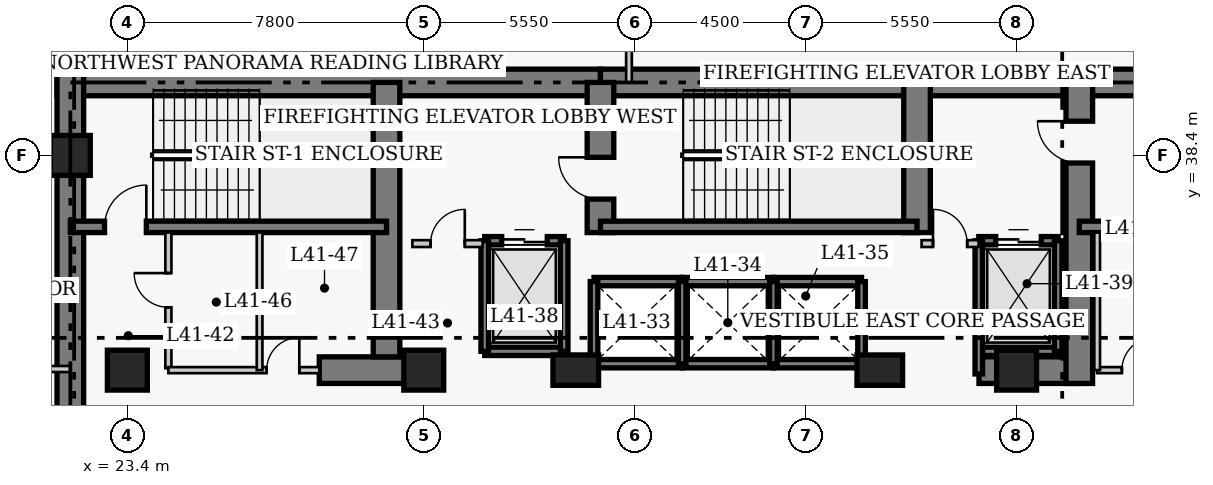
"""IFC4 building model, lengths in metres.
Left out: names, types, materials, properties, quantities, classifications, styles, units other than length and angle.
Written with IfcOpenShell. Run it as: python <this file> out.ifc"""

import sys

from ifc_helpers import new_model, si_unit, direction, frame, frame_2d, origin, origin_2d, place, context, subcontext, project, spatial, rectangle, extrude, element, fill, save


model = new_model("IFC4")
c1 = context("Model", 3, precision=1e-05, world=origin(), true_north=direction((0.0, 1.0)))
c2 = subcontext(c1, "Body", "Model", "MODEL_VIEW")
j1 = project(units=[si_unit("LENGTHUNIT", "METRE"), si_unit("PLANEANGLEUNIT", "RADIAN")], contexts=[c1])
p1 = place(None, origin())
s1 = spatial("IfcSite", under=j1, at=p1, CompositionType="ELEMENT")
p2 = place(p1, origin())
s2 = spatial("IfcBuilding", under=s1, at=p2, CompositionType="ELEMENT")
p3 = place(p2, frame((0.0, 0.0, 165.0)))
s3 = spatial("IfcBuildingStorey", under=s2, at=p3, CompositionType="ELEMENT", Elevation=165.0)
p4 = place(p3, frame((21.55, 40.32, 0.0), z_axis=(0.0, 0.0, 1.0), x_axis=(1.0, 0.0, 0.0)))
e1 = element("IfcWall", 1, at=p4, inside=s3, PredefinedType="SHEAR", context=c2, shape_type="SweptSolid", body=[
    extrude(rectangle(XDim=14.3, YDim=0.7, at=frame_2d((7.15, 0.0))), origin(), (0.0, 0.0, 1.0), 3.8),
])
p5 = place(p3, frame((35.85, 40.32, 0.0), z_axis=(0.0, 0.0, 1.0), x_axis=(1.0, 0.0, 0.0)))
e2 = element("IfcWall", 2, at=p5, inside=s3, PredefinedType="SHEAR", context=c2, shape_type="SweptSolid", body=[
    extrude(rectangle(XDim=12.6, YDim=0.7, at=frame_2d((6.3, 0.0))), origin(), (0.0, 0.0, 1.0), 3.8),
])
p6 = place(p3, frame((48.45, 40.32, 0.0), z_axis=(0.0, 0.0, 1.0), x_axis=(1.0, 0.0, 0.0)))
e3 = element("IfcWall", 3, at=p6, inside=s3, PredefinedType="SHEAR", context=c2, shape_type="SweptSolid", body=[
    extrude(rectangle(XDim=8.77, YDim=0.7, at=frame_2d((4.385, 0.0))), origin(), (0.0, 0.0, 1.0), 3.8),
])
p7 = place(p3, frame((21.9, 27.05, 0.0), z_axis=(0.0, 0.0, 1.0), x_axis=(0.0, 1.0, 0.0)))
e4 = element("IfcWall", 4, at=p7, inside=s3, PredefinedType="SHEAR", context=c2, shape_type="SweptSolid", body=[
    extrude(rectangle(XDim=13.62, YDim=0.7, at=frame_2d((6.81, 0.0))), origin(), (0.0, 0.0, 1.0), 3.8),
])
p8 = place(p3, frame((28.45, 32.75, 0.0), z_axis=(0.0, 0.0, 1.0), x_axis=(1.0, 0.0, 0.0)))
e5 = element("IfcWall", 5, at=p8, inside=s3, PredefinedType="SHEAR", context=c2, shape_type="SweptSolid", body=[
    extrude(rectangle(XDim=2.4, YDim=0.7, at=frame_2d((1.2, 0.0))), origin(), (0.0, 0.0, 1.0), 3.8),
])
p9 = place(p3, frame((45.81, 32.75, 0.0), z_axis=(0.0, 0.0, 1.0), x_axis=(1.0, 0.0, 0.0)))
e6 = element("IfcWall", 6, at=p9, inside=s3, PredefinedType="SHEAR", context=c2, shape_type="SweptSolid", body=[
    extrude(rectangle(XDim=2.64, YDim=0.7, at=frame_2d((1.32, 0.0))), origin(), (0.0, 0.0, 1.0), 3.8),
])
p10 = place(p3, frame((30.22, 33.1, 0.0), z_axis=(0.0, 0.0, 1.0), x_axis=(0.0, 1.0, 0.0)))
e7 = element("IfcWall", 7, at=p10, inside=s3, PredefinedType="SHEAR", context=c2, shape_type="SweptSolid", body=[
    extrude(rectangle(XDim=7.22, YDim=0.7, at=frame_2d((3.61, 0.0))), origin(), (0.0, 0.0, 1.0), 3.8),
])
p11 = place(p3, frame((35.85, 36.37, 0.0), z_axis=(0.0, 0.0, 1.0), x_axis=(0.0, 1.0, 0.0)))
e8 = element("IfcWall", 8, at=p11, inside=s3, PredefinedType="SHEAR", context=c2, shape_type="SweptSolid", body=[
    extrude(rectangle(XDim=3.95, YDim=0.7, at=frame_2d((1.975, 0.0))), origin(), (0.0, 0.0, 1.0), 3.8),
])
p12 = place(p11, frame((0.88, 0.0, 0.0)))
e9 = element("IfcOpeningElement", 9, at=p12, cuts=e8, PredefinedType="OPENING", context=c2, shape_type="SweptSolid", body=[
    extrude(rectangle(XDim=1.1, YDim=2.15, at=frame_2d((0.55, 1.075))), frame((0.0, 0.36, 0.0), z_axis=(0.0, -1.0, 0.0), x_axis=(1.0, 0.0, 0.0)), (0.0, 0.0, 1.0), 0.72),
])
p13 = place(p3, frame((44.18, 36.37, 0.0), z_axis=(0.0, 0.0, 1.0), x_axis=(0.0, 1.0, 0.0)))
e10 = element("IfcWall", 10, at=p13, inside=s3, PredefinedType="SHEAR", context=c2, shape_type="SweptSolid", body=[
    extrude(rectangle(XDim=3.95, YDim=0.7, at=frame_2d((1.975, 0.0))), origin(), (0.0, 0.0, 1.0), 3.8),
])
p14 = place(p3, frame((48.45, 32.4, 0.0), z_axis=(0.0, 0.0, 1.0), x_axis=(0.0, 1.0, 0.0)))
e11 = element("IfcWall", 11, at=p14, inside=s3, PredefinedType="SHEAR", context=c2, shape_type="SweptSolid", body=[
    extrude(rectangle(XDim=7.92, YDim=0.7, at=frame_2d((3.96, 0.0))), origin(), (0.0, 0.0, 1.0), 3.8),
])
p15 = place(p14, frame((5.8, 0.0, 0.0)))
e12 = element("IfcOpeningElement", 12, at=p15, cuts=e11, PredefinedType="OPENING", context=c2, shape_type="SweptSolid", body=[
    extrude(rectangle(XDim=1.1, YDim=2.15, at=frame_2d((0.55, 1.075))), frame((0.0, 0.36, 0.0), z_axis=(0.0, -1.0, 0.0), x_axis=(1.0, 0.0, 0.0)), (0.0, 0.0, 1.0), 0.72),
])
p16 = place(p3, frame((21.9, 36.52, 0.0), z_axis=(0.0, 0.0, 1.0), x_axis=(1.0, 0.0, 0.0)))
e13 = element("IfcWall", 13, at=p16, inside=s3, PredefinedType="SHEAR", context=c2, shape_type="SweptSolid", body=[
    extrude(rectangle(XDim=8.32, YDim=0.3, at=frame_2d((4.16, 0.0))), origin(), (0.0, 0.0, 1.0), 3.8),
])
p17 = place(p16, frame((0.9, 0.0, 0.0)))
e14 = element("IfcOpeningElement", 14, at=p17, cuts=e13, PredefinedType="OPENING", context=c2, shape_type="SweptSolid", body=[
    extrude(rectangle(XDim=1.1, YDim=2.15, at=frame_2d((0.55, 1.075))), frame((0.0, 0.16, 0.0), z_axis=(0.0, -1.0, 0.0), x_axis=(1.0, 0.0, 0.0)), (0.0, 0.0, 1.0), 0.32),
])
p18 = place(p3, frame((35.85, 36.52, 0.0), z_axis=(0.0, 0.0, 1.0), x_axis=(1.0, 0.0, 0.0)))
e15 = element("IfcWall", 15, at=p18, inside=s3, PredefinedType="SHEAR", context=c2, shape_type="SweptSolid", body=[
    extrude(rectangle(XDim=8.33, YDim=0.3, at=frame_2d((4.165, 0.0))), origin(), (0.0, 0.0, 1.0), 3.8),
])
p19 = place(p3, frame((48.45, 36.52, 0.0), z_axis=(0.0, 0.0, 1.0), x_axis=(1.0, 0.0, 0.0)))
e16 = element("IfcWall", 16, at=p19, inside=s3, PredefinedType="SHEAR", context=c2, shape_type="SweptSolid", body=[
    extrude(rectangle(XDim=8.42, YDim=0.3, at=frame_2d((4.21, 0.0))), origin(), (0.0, 0.0, 1.0), 3.8),
])
for number, where, z_axis, x_axis in (
    (17, (21.9, 38.4, 0.0), (0.0, 0.0, 1.0), (1.0, 0.0, 0.0)),
    (18, (23.4, 32.75, 0.0), (0.0, 0.0, 1.0), (1.0, 0.0, 0.0)),
    (19, (31.2, 32.75, 0.0), (0.0, 0.0, 1.0), (1.0, 0.0, 0.0)),
):
    element("IfcColumn", number, at=place(p3, frame(where, z_axis=z_axis, x_axis=x_axis)), inside=s3, PredefinedType="COLUMN", context=c2, shape_type="SweptSolid", body=[
        extrude(rectangle(XDim=1.05, YDim=1.05, at=origin_2d()), origin(), (0.0, 0.0, 1.0), 3.8),
    ])
for number, where, z_axis, x_axis in (
    (20, (35.2, 32.75, 0.0), (0.0, 0.0, 1.0), (1.0, 0.0, 0.0)),
    (21, (43.2, 32.75, 0.0), (0.0, 0.0, 1.0), (1.0, 0.0, 0.0)),
):
    element("IfcColumn", number, at=place(p3, frame(where, z_axis=z_axis, x_axis=x_axis)), inside=s3, PredefinedType="COLUMN", context=c2, shape_type="SweptSolid", body=[
        extrude(rectangle(XDim=1.2, YDim=0.8, at=origin_2d()), origin(), (0.0, 0.0, 1.0), 3.8),
    ])
p20 = place(p3, frame((46.8, 32.75, 0.0), z_axis=(0.0, 0.0, 1.0), x_axis=(1.0, 0.0, 0.0)))
e22 = element("IfcColumn", 22, at=p20, inside=s3, PredefinedType="COLUMN", context=c2, shape_type="SweptSolid", body=[
    extrude(rectangle(XDim=1.05, YDim=1.05, at=origin_2d()), origin(), (0.0, 0.0, 1.0), 3.8),
])
for number, where, z_axis, x_axis in (
    (23, (35.68, 35.08, 0.0), (0.0, 0.0, 1.0), (1.0, 0.0, 0.0)),
    (24, (35.68, 32.92, 0.0), (0.0, 0.0, 1.0), (1.0, 0.0, 0.0)),
):
    element("IfcWall", number, at=place(p3, frame(where, z_axis=z_axis, x_axis=x_axis)), inside=s3, PredefinedType="SHEAR", context=c2, shape_type="SweptSolid", body=[
        extrude(rectangle(XDim=2.32, YDim=0.22, at=frame_2d((1.16, 0.0))), origin(), (0.0, 0.0, 1.0), 3.8),
    ])
p21 = place(p3, frame((35.68, 32.92, 0.0), z_axis=(0.0, 0.0, 1.0), x_axis=(0.0, 1.0, 0.0)))
e25 = element("IfcWall", 25, at=p21, inside=s3, PredefinedType="SHEAR", context=c2, shape_type="SweptSolid", body=[
    extrude(rectangle(XDim=2.16, YDim=0.2, at=frame_2d((1.08, 0.0))), origin(), (0.0, 0.0, 1.0), 3.8),
])
for number, where, z_axis, x_axis in (
    (26, (38.0, 35.08, 0.0), (0.0, 0.0, 1.0), (1.0, 0.0, 0.0)),
    (27, (38.0, 32.92, 0.0), (0.0, 0.0, 1.0), (1.0, 0.0, 0.0)),
):
    element("IfcWall", number, at=place(p3, frame(where, z_axis=z_axis, x_axis=x_axis)), inside=s3, PredefinedType="SHEAR", context=c2, shape_type="SweptSolid", body=[
        extrude(rectangle(XDim=2.4, YDim=0.22, at=frame_2d((1.2, 0.0))), origin(), (0.0, 0.0, 1.0), 3.8),
    ])
p22 = place(p3, frame((38.0, 32.92, 0.0), z_axis=(0.0, 0.0, 1.0), x_axis=(0.0, 1.0, 0.0)))
e28 = element("IfcWall", 28, at=p22, inside=s3, PredefinedType="SHEAR", context=c2, shape_type="SweptSolid", body=[
    extrude(rectangle(XDim=2.16, YDim=0.2, at=frame_2d((1.08, 0.0))), origin(), (0.0, 0.0, 1.0), 3.8),
])
for number, where, z_axis, x_axis in (
    (29, (40.4, 35.08, 0.0), (0.0, 0.0, 1.0), (1.0, 0.0, 0.0)),
    (30, (40.4, 32.92, 0.0), (0.0, 0.0, 1.0), (1.0, 0.0, 0.0)),
):
    element("IfcWall", number, at=place(p3, frame(where, z_axis=z_axis, x_axis=x_axis)), inside=s3, PredefinedType="SHEAR", context=c2, shape_type="SweptSolid", body=[
        extrude(rectangle(XDim=2.32, YDim=0.22, at=frame_2d((1.16, 0.0))), origin(), (0.0, 0.0, 1.0), 3.8),
    ])
for number, where, z_axis, x_axis in (
    (31, (40.4, 32.92, 0.0), (0.0, 0.0, 1.0), (0.0, 1.0, 0.0)),
    (32, (42.72, 32.92, 0.0), (0.0, 0.0, 1.0), (0.0, 1.0, 0.0)),
):
    element("IfcWall", number, at=place(p3, frame(where, z_axis=z_axis, x_axis=x_axis)), inside=s3, PredefinedType="SHEAR", context=c2, shape_type="SweptSolid", body=[
        extrude(rectangle(XDim=2.16, YDim=0.2, at=frame_2d((1.08, 0.0))), origin(), (0.0, 0.0, 1.0), 3.8),
    ])
p23 = place(p3, frame((32.805, 36.155, 0.0), z_axis=(0.0, 0.0, 1.0), x_axis=(1.0, 0.0, 0.0)))
e33 = element("IfcWall", 33, at=p23, inside=s3, PredefinedType="SHEAR", context=c2, shape_type="SweptSolid", body=[
    extrude(rectangle(XDim=2.09, YDim=0.22, at=frame_2d((1.045, 0.0))), origin(), (0.0, 0.0, 1.0), 3.8),
])
p24 = place(p23, frame((0.445, 0.0, 0.0)))
e34 = element("IfcOpeningElement", 34, at=p24, cuts=e33, PredefinedType="OPENING", context=c2, shape_type="SweptSolid", body=[
    extrude(rectangle(XDim=1.2, YDim=2.15, at=frame_2d((0.6, 1.075))), frame((0.0, 0.12, 0.0), z_axis=(0.0, -1.0, 0.0), x_axis=(1.0, 0.0, 0.0)), (0.0, 0.0, 1.0), 0.24),
])
p25 = place(p3, frame((32.805, 33.245, 0.0), z_axis=(0.0, 0.0, 1.0), x_axis=(1.0, 0.0, 0.0)))
e35 = element("IfcWall", 35, at=p25, inside=s3, PredefinedType="SHEAR", context=c2, shape_type="SweptSolid", body=[
    extrude(rectangle(XDim=2.09, YDim=0.22, at=frame_2d((1.045, 0.0))), origin(), (0.0, 0.0, 1.0), 3.8),
])
for number, where, z_axis, x_axis in (
    (36, (32.805, 33.245, 0.0), (0.0, 0.0, 1.0), (0.0, 1.0, 0.0)),
    (37, (34.895, 33.245, 0.0), (0.0, 0.0, 1.0), (0.0, 1.0, 0.0)),
):
    element("IfcWall", number, at=place(p3, frame(where, z_axis=z_axis, x_axis=x_axis)), inside=s3, PredefinedType="SHEAR", context=c2, shape_type="SweptSolid", body=[
        extrude(rectangle(XDim=2.91, YDim=0.2, at=frame_2d((1.455, 0.0))), origin(), (0.0, 0.0, 1.0), 3.8),
    ])
p26 = place(p3, frame((45.805, 36.155, 0.0), z_axis=(0.0, 0.0, 1.0), x_axis=(1.0, 0.0, 0.0)))
e38 = element("IfcWall", 38, at=p26, inside=s3, PredefinedType="SHEAR", context=c2, shape_type="SweptSolid", body=[
    extrude(rectangle(XDim=2.09, YDim=0.22, at=frame_2d((1.045, 0.0))), origin(), (0.0, 0.0, 1.0), 3.8),
])
p27 = place(p26, frame((0.445, 0.0, 0.0)))
e39 = element("IfcOpeningElement", 39, at=p27, cuts=e38, PredefinedType="OPENING", context=c2, shape_type="SweptSolid", body=[
    extrude(rectangle(XDim=1.2, YDim=2.15, at=frame_2d((0.6, 1.075))), frame((0.0, 0.12, 0.0), z_axis=(0.0, -1.0, 0.0), x_axis=(1.0, 0.0, 0.0)), (0.0, 0.0, 1.0), 0.24),
])
p28 = place(p3, frame((45.805, 33.245, 0.0), z_axis=(0.0, 0.0, 1.0), x_axis=(1.0, 0.0, 0.0)))
e40 = element("IfcWall", 40, at=p28, inside=s3, PredefinedType="SHEAR", context=c2, shape_type="SweptSolid", body=[
    extrude(rectangle(XDim=2.09, YDim=0.22, at=frame_2d((1.045, 0.0))), origin(), (0.0, 0.0, 1.0), 3.8),
])
p29 = place(p3, frame((45.805, 32.65, 0.0), z_axis=(0.0, 0.0, 1.0), x_axis=(0.0, 1.0, 0.0)))
e41 = element("IfcWall", 41, at=p29, inside=s3, PredefinedType="SHEAR", context=c2, shape_type="SweptSolid", body=[
    extrude(rectangle(XDim=3.505, YDim=0.2, at=frame_2d((1.752, 0.0))), origin(), (0.0, 0.0, 1.0), 3.8),
])
p30 = place(p3, frame((47.895, 33.245, 0.0), z_axis=(0.0, 0.0, 1.0), x_axis=(0.0, 1.0, 0.0)))
e42 = element("IfcWall", 42, at=p30, inside=s3, PredefinedType="SHEAR", context=c2, shape_type="SweptSolid", body=[
    extrude(rectangle(XDim=2.91, YDim=0.2, at=frame_2d((1.455, 0.0))), origin(), (0.0, 0.0, 1.0), 3.8),
])
p31 = place(p3, frame((30.9, 36.08, 0.0), z_axis=(0.0, 0.0, 1.0), x_axis=(1.0, 0.0, 0.0)))
e43 = element("IfcWall", 43, at=p31, inside=s3, PredefinedType="PARTITIONING", context=c2, shape_type="SweptSolid", body=[
    extrude(rectangle(XDim=1.85, YDim=0.18, at=frame_2d((0.925, 0.0))), origin(), (0.0, 0.0, 1.0), 3.55),
])
p32 = place(p31, frame((0.48, 0.0, 0.0)))
e44 = element("IfcOpeningElement", 44, at=p32, cuts=e43, PredefinedType="OPENING", context=c2, shape_type="SweptSolid", body=[
    extrude(rectangle(XDim=0.9, YDim=2.15, at=frame_2d((0.45, 1.075))), frame((0.0, 0.1, 0.0), z_axis=(0.0, -1.0, 0.0), x_axis=(1.0, 0.0, 0.0)), (0.0, 0.0, 1.0), 0.2),
])
p33 = place(p3, frame((44.3, 36.08, 0.0), z_axis=(0.0, 0.0, 1.0), x_axis=(1.0, 0.0, 0.0)))
e45 = element("IfcWall", 45, at=p33, inside=s3, PredefinedType="PARTITIONING", context=c2, shape_type="SweptSolid", body=[
    extrude(rectangle(XDim=1.5, YDim=0.18, at=frame_2d((0.75, 0.0))), origin(), (0.0, 0.0, 1.0), 3.55),
])
p34 = place(p33, frame((0.3, 0.0, 0.0)))
e46 = element("IfcOpeningElement", 46, at=p34, cuts=e45, PredefinedType="OPENING", context=c2, shape_type="SweptSolid", body=[
    extrude(rectangle(XDim=0.9, YDim=2.15, at=frame_2d((0.45, 1.075))), frame((0.0, 0.1, 0.0), z_axis=(0.0, -1.0, 0.0), x_axis=(1.0, 0.0, 0.0)), (0.0, 0.0, 1.0), 0.2),
])
p35 = place(p3, frame((24.48, 32.8, 0.0), z_axis=(0.0, 0.0, 1.0), x_axis=(0.0, 1.0, 0.0)))
e47 = element("IfcWall", 47, at=p35, inside=s3, PredefinedType="PARTITIONING", context=c2, shape_type="SweptSolid", body=[
    extrude(rectangle(XDim=3.57, YDim=0.16, at=frame_2d((1.785, 0.0))), origin(), (0.0, 0.0, 1.0), 3.55),
])
p36 = place(p35, frame((1.604, 0.0, 0.0)))
e48 = element("IfcOpeningElement", 48, at=p36, cuts=e47, PredefinedType="OPENING", context=c2, shape_type="SweptSolid", body=[
    extrude(rectangle(XDim=0.9, YDim=2.1, at=frame_2d((0.45, 1.05))), frame((0.0, 0.09, 0.0), z_axis=(0.0, -1.0, 0.0), x_axis=(1.0, 0.0, 0.0)), (0.0, 0.0, 1.0), 0.18),
])
p37 = place(p3, frame((24.48, 32.75, 0.0), z_axis=(0.0, 0.0, 1.0), x_axis=(1.0, 0.0, 0.0)))
e49 = element("IfcWall", 49, at=p37, inside=s3, PredefinedType="PARTITIONING", context=c2, shape_type="SweptSolid", body=[
    extrude(rectangle(XDim=3.97, YDim=0.16, at=frame_2d((1.985, 0.0))), origin(), (0.0, 0.0, 1.0), 3.55),
])
p38 = place(p37, frame((2.585, 0.0, 0.0)))
e50 = element("IfcOpeningElement", 50, at=p38, cuts=e49, PredefinedType="OPENING", context=c2, shape_type="SweptSolid", body=[
    extrude(rectangle(XDim=0.86, YDim=2.05, at=frame_2d((0.43, 1.025))), frame((0.0, 0.09, 0.0), z_axis=(0.0, -1.0, 0.0), x_axis=(1.0, 0.0, 0.0)), (0.0, 0.0, 1.0), 0.18),
])
p39 = place(p3, frame((48.92, 32.75, 0.0), z_axis=(0.0, 0.0, 1.0), x_axis=(1.0, 0.0, 0.0)))
e51 = element("IfcWall", 51, at=p39, inside=s3, PredefinedType="PARTITIONING", context=c2, shape_type="SweptSolid", body=[
    extrude(rectangle(XDim=2.2, YDim=0.16, at=frame_2d((1.1, 0.0))), origin(), (0.0, 0.0, 1.0), 3.55),
])
p40 = place(p39, frame((0.65, 0.0, 0.0)))
e52 = element("IfcOpeningElement", 52, at=p40, cuts=e51, PredefinedType="OPENING", context=c2, shape_type="SweptSolid", body=[
    extrude(rectangle(XDim=0.86, YDim=2.05, at=frame_2d((0.43, 1.025))), frame((0.0, 0.09, 0.0), z_axis=(0.0, -1.0, 0.0), x_axis=(1.0, 0.0, 0.0)), (0.0, 0.0, 1.0), 0.18),
])
for number, where, z_axis, x_axis in (
    (53, (48.92, 32.75, 0.0), (0.0, 0.0, 1.0), (0.0, 1.0, 0.0)),
    (54, (26.88, 32.75, 0.0), (0.0, 0.0, 1.0), (0.0, 1.0, 0.0)),
):
    element("IfcWall", number, at=place(p3, frame(where, z_axis=z_axis, x_axis=x_axis)), inside=s3, PredefinedType="PARTITIONING", context=c2, shape_type="SweptSolid", body=[
        extrude(rectangle(XDim=3.62, YDim=0.15, at=frame_2d((1.81, 0.0))), origin(), (0.0, 0.0, 1.0), 3.55),
    ])
for number, where, z_axis, x_axis in (
    (55, (18.86, 35.02, 0.0), (0.0, 0.0, 1.0), (1.0, 0.0, 0.0)),
    (56, (18.86, 32.78, 0.0), (0.0, 0.0, 1.0), (1.0, 0.0, 0.0)),
):
    element("IfcWall", number, at=place(p3, frame(where, z_axis=z_axis, x_axis=x_axis)), inside=s3, PredefinedType="PARTITIONING", context=c2, shape_type="SweptSolid", body=[
        extrude(rectangle(XDim=3.04, YDim=0.16, at=frame_2d((1.52, 0.0))), origin(), (0.0, 0.0, 1.0), 3.55),
    ])
p41 = place(p3, frame((16.64, 40.65, 0.0), z_axis=(0.0, 0.0, 1.0), x_axis=(1.0, 0.0, 0.0)))
e57 = element("IfcWall", 57, at=p41, inside=s3, PredefinedType="PARTITIONING", context=c2, shape_type="SweptSolid", body=[
    extrude(rectangle(XDim=5.46, YDim=0.15, at=frame_2d((2.73, 0.0))), origin(), (0.0, 0.0, 1.0), 3.55),
])
p42 = place(p41, frame((0.55, 0.0, 0.0)))
e58 = element("IfcOpeningElement", 58, at=p42, cuts=e57, PredefinedType="OPENING", context=c2, shape_type="SweptSolid", body=[
    extrude(rectangle(XDim=1.0, YDim=2.15, at=frame_2d((0.5, 1.075))), frame((0.0, 0.085, 0.0), z_axis=(0.0, -1.0, 0.0), x_axis=(1.0, 0.0, 0.0)), (0.0, 0.0, 1.0), 0.17),
])
p43 = place(p3, frame((36.6, 40.32, 0.0), z_axis=(0.0, 0.0, 1.0), x_axis=(0.0, 1.0, 0.0)))
e59 = element("IfcWall", 59, at=p43, inside=s3, PredefinedType="PARTITIONING", context=c2, shape_type="SweptSolid", body=[
    extrude(rectangle(XDim=1.845, YDim=0.15, at=frame_2d((0.922, 0.0))), origin(), (0.0, 0.0, 1.0), 3.55),
])
p44 = place(p24, origin())
e60 = element("IfcDoor", 60, at=p44, inside=s3, OperationType="DOUBLE_DOOR_SLIDING", PredefinedType="DOOR", context=c2, shape_type="SweptSolid", body=[
    extrude(rectangle(XDim=1.2, YDim=2.15, at=frame_2d((0.6, 1.075))), frame((0.0, 0.025, 0.0), z_axis=(0.0, -1.0, 0.0), x_axis=(1.0, 0.0, 0.0)), (0.0, 0.0, 1.0), 0.05),
])
fill(e34, e60)
p45 = place(p27, origin())
e61 = element("IfcDoor", 61, at=p45, inside=s3, OperationType="DOUBLE_DOOR_SLIDING", PredefinedType="DOOR", context=c2, shape_type="SweptSolid", body=[
    extrude(rectangle(XDim=1.2, YDim=2.15, at=frame_2d((0.6, 1.075))), frame((0.0, 0.025, 0.0), z_axis=(0.0, -1.0, 0.0), x_axis=(1.0, 0.0, 0.0)), (0.0, 0.0, 1.0), 0.05),
])
fill(e39, e61)
p46 = place(p32, origin())
e62 = element("IfcDoor", 62, at=p46, inside=s3, OperationType="SINGLE_SWING_RIGHT", PredefinedType="DOOR", context=c2, shape_type="SweptSolid", body=[
    extrude(rectangle(XDim=0.9, YDim=2.15, at=frame_2d((0.45, 1.075))), frame((0.0, 0.025, 0.0), z_axis=(0.0, -1.0, 0.0), x_axis=(1.0, 0.0, 0.0)), (0.0, 0.0, 1.0), 0.05),
])
fill(e44, e62)
p47 = place(p34, origin())
e63 = element("IfcDoor", 63, at=p47, inside=s3, OperationType="SINGLE_SWING_LEFT", PredefinedType="DOOR", context=c2, shape_type="SweptSolid", body=[
    extrude(rectangle(XDim=0.9, YDim=2.15, at=frame_2d((0.45, 1.075))), frame((0.0, 0.025, 0.0), z_axis=(0.0, -1.0, 0.0), x_axis=(1.0, 0.0, 0.0)), (0.0, 0.0, 1.0), 0.05),
])
fill(e46, e63)
p48 = place(p36, origin())
e64 = element("IfcDoor", 64, at=p48, inside=s3, OperationType="SINGLE_SWING_RIGHT", PredefinedType="DOOR", context=c2, shape_type="SweptSolid", body=[
    extrude(rectangle(XDim=0.9, YDim=2.1, at=frame_2d((0.45, 1.05))), frame((0.0, 0.025, 0.0), z_axis=(0.0, -1.0, 0.0), x_axis=(1.0, 0.0, 0.0)), (0.0, 0.0, 1.0), 0.05),
])
fill(e48, e64)
p49 = place(p38, origin())
e65 = element("IfcDoor", 65, at=p49, inside=s3, OperationType="SINGLE_SWING_RIGHT", PredefinedType="DOOR", context=c2, shape_type="SweptSolid", body=[
    extrude(rectangle(XDim=0.86, YDim=2.05, at=frame_2d((0.43, 1.025))), frame((0.0, 0.025, 0.0), z_axis=(0.0, -1.0, 0.0), x_axis=(1.0, 0.0, 0.0)), (0.0, 0.0, 1.0), 0.05),
])
fill(e50, e65)
p50 = place(p40, origin())
e66 = element("IfcDoor", 66, at=p50, inside=s3, OperationType="SINGLE_SWING_RIGHT", PredefinedType="DOOR", context=c2, shape_type="SweptSolid", body=[
    extrude(rectangle(XDim=0.86, YDim=2.05, at=frame_2d((0.43, 1.025))), frame((0.0, 0.025, 0.0), z_axis=(0.0, -1.0, 0.0), x_axis=(1.0, 0.0, 0.0)), (0.0, 0.0, 1.0), 0.05),
])
fill(e52, e66)
p51 = place(p17, origin())
e67 = element("IfcDoor", 67, at=p51, inside=s3, OperationType="SINGLE_SWING_RIGHT", PredefinedType="DOOR", context=c2, shape_type="SweptSolid", body=[
    extrude(rectangle(XDim=1.1, YDim=2.15, at=frame_2d((0.55, 1.075))), frame((0.0, 0.025, 0.0), z_axis=(0.0, -1.0, 0.0), x_axis=(1.0, 0.0, 0.0)), (0.0, 0.0, 1.0), 0.05),
])
fill(e14, e67)
p52 = place(p12, origin())
e68 = element("IfcDoor", 68, at=p52, inside=s3, OperationType="SINGLE_SWING_RIGHT", PredefinedType="DOOR", context=c2, shape_type="SweptSolid", body=[
    extrude(rectangle(XDim=1.1, YDim=2.15, at=frame_2d((0.55, 1.075))), frame((0.0, 0.025, 0.0), z_axis=(0.0, -1.0, 0.0), x_axis=(1.0, 0.0, 0.0)), (0.0, 0.0, 1.0), 0.05),
])
fill(e9, e68)
p53 = place(p15, origin())
e69 = element("IfcDoor", 69, at=p53, inside=s3, OperationType="SINGLE_SWING_RIGHT", PredefinedType="DOOR", context=c2, shape_type="SweptSolid", body=[
    extrude(rectangle(XDim=1.1, YDim=2.15, at=frame_2d((0.55, 1.075))), frame((0.0, 0.025, 0.0), z_axis=(0.0, -1.0, 0.0), x_axis=(1.0, 0.0, 0.0)), (0.0, 0.0, 1.0), 0.05),
])
fill(e12, e69)
save(model, sys.argv[1])
